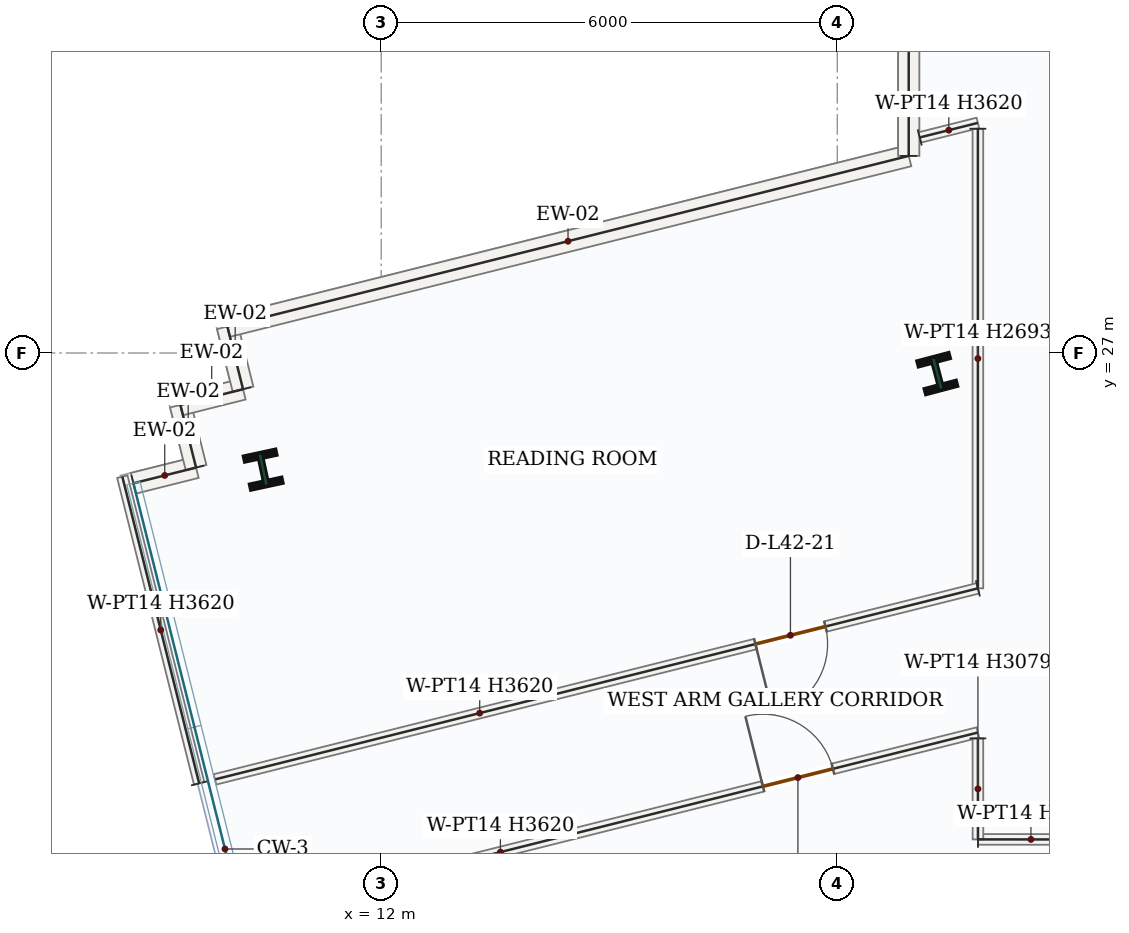
"""IFC4 building model, lengths in metres.
Left out: names, types, materials, properties, quantities, classifications, styles, units other than length and angle.
Written with IfcOpenShell. Run it as: python <this file> out.ifc"""

import sys

from ifc_helpers import new_model, si_unit, direction, frame, frame_2d, origin, origin_2d, place, context, subcontext, project, spatial, rectangle, i_section, extrude, source, transform, mapped, element, fill, save


model = new_model("IFC4")
c1 = context("Model", 3, precision=1e-05, world=origin(), true_north=direction((0.0, 1.0)))
c2 = subcontext(c1, "Body", "Model", "MODEL_VIEW")
j1 = project(units=[si_unit("LENGTHUNIT", "METRE"), si_unit("PLANEANGLEUNIT", "RADIAN")], contexts=[c1])
p1 = place(None, origin())
s1 = spatial("IfcSite", under=j1, at=p1, CompositionType="ELEMENT")
p2 = place(p1, origin())
s2 = spatial("IfcBuilding", under=s1, at=p2, CompositionType="ELEMENT")
p3 = place(p2, frame((0.0, 0.0, 182.4)))
s3 = spatial("IfcBuildingStorey", under=s2, at=p3, CompositionType="ELEMENT", Elevation=182.4)
m1 = source(origin(), c2, "Body", "SweptSolid", [
    extrude(i_section(OverallWidth=0.412, OverallDepth=0.435, WebThickness=0.036, FlangeThickness=0.057, FilletRadius=0.018, at=origin_2d()), origin(), (0.0, 0.0, 1.0), 3.9),
])
for number, where, z_axis, x_axis in (
    (1, (19.316, 26.729, 0.0), (0.0, 0.0, 1.0), (0.967, 0.255, 0.0)),
    (2, (10.447, 25.465, 0.0), (0.0, 0.0, 1.0), (0.977, 0.211, 0.0)),
):
    element("IfcColumn", number, at=place(p3, frame(where, z_axis=z_axis, x_axis=x_axis)), inside=s3, PredefinedType="COLUMN", context=c2, shape_type="MappedRepresentation", body=[
        mapped(m1, transform((0.0, 0.0, 0.0), x_axis=(1.0, 0.0, 0.0), y_axis=(0.0, 1.0, 0.0), z_axis=(0.0, 0.0, 1.0), scale=1.0)),
    ])
m2 = source(origin(), c2, "Body", "SweptSolid", [
    extrude(rectangle(XDim=0.85, YDim=0.28, at=frame_2d((0.425, 0.0))), origin(), (0.0, 0.0, 1.0), 3.62),
])
for number, where, z_axis, x_axis in (
    (3, (8.74, 25.286, 0.0), (0.0, 0.0, 1.0), (0.97, 0.243, 0.0)),
    (4, (9.564, 25.493, 0.0), (0.0, 0.0, 1.0), (-0.243, 0.97, 0.0)),
):
    element("IfcWall", number, at=place(p3, frame(where, z_axis=z_axis, x_axis=x_axis)), inside=s3, PredefinedType="SOLIDWALL", context=c2, shape_type="MappedRepresentation", body=[
        mapped(m2, transform((0.0, 0.0, 0.0), x_axis=(1.0, 0.0, 0.0), y_axis=(0.0, 1.0, 0.0), z_axis=(0.0, 0.0, 1.0), scale=1.0)),
    ])
m3 = source(origin(), c2, "Body", "SweptSolid", [
    extrude(rectangle(XDim=0.85, YDim=0.28, at=frame_2d((0.425, 0.0))), origin(), (0.0, 0.0, 1.0), 3.62),
])
p4 = place(p3, frame((9.358, 26.317, 0.0), z_axis=(0.0, 0.0, 1.0), x_axis=(0.970041063326, 0.242941012307, 0.0)))
e5 = element("IfcWall", 5, at=p4, inside=s3, PredefinedType="SOLIDWALL", context=c2, shape_type="MappedRepresentation", body=[
    mapped(m3, transform((0.0, 0.0, 0.0), x_axis=(1.0, 0.0, 0.0), y_axis=(0.0, 1.0, 0.0), z_axis=(0.0, 0.0, 1.0), scale=1.0)),
])
p5 = place(p3, frame((10.182, 26.524, 0.0), z_axis=(0.0, 0.0, 1.0), x_axis=(-0.243008704507, 0.970024107708, 0.0)))
e6 = element("IfcWall", 6, at=p5, inside=s3, PredefinedType="SOLIDWALL", context=c2, shape_type="MappedRepresentation", body=[
    mapped(m2, transform((0.0, 0.0, 0.0), x_axis=(1.0, 0.0, 0.0), y_axis=(0.0, 1.0, 0.0), z_axis=(0.0, 0.0, 1.0), scale=1.0)),
])
m4 = source(origin(), c2, "Body", "SweptSolid", [
    extrude(rectangle(XDim=9.241, YDim=0.28, at=frame_2d((4.621, 0.0))), origin(), (0.0, 0.0, 1.0), 3.62),
])
p6 = place(p3, frame((9.976, 27.348, 0.0), z_axis=(0.0, 0.0, 1.0), x_axis=(0.970044513566, 0.242927235402, 0.0)))
e7 = element("IfcWall", 7, at=p6, inside=s3, PredefinedType="SOLIDWALL", context=c2, shape_type="MappedRepresentation", body=[
    mapped(m4, transform((0.0, 0.0, 0.0), x_axis=(1.0, 0.0, 0.0), y_axis=(0.0, 1.0, 0.0), z_axis=(0.0, 0.0, 1.0), scale=1.0)),
])
m5 = source(origin(), c2, "Body", "SweptSolid", [
    extrude(rectangle(XDim=5.949, YDim=0.28, at=frame_2d((2.975, 0.0))), origin(), (0.0, 0.0, 1.0), 3.62),
])
p7 = place(p3, frame((18.94, 29.593, 0.0), z_axis=(0.0, 0.0, 1.0), x_axis=(0.0, 1.0, 0.0)))
e8 = element("IfcWall", 8, at=p7, inside=s3, PredefinedType="SOLIDWALL", context=c2, shape_type="MappedRepresentation", body=[
    mapped(m5, transform((0.0, 0.0, 0.0), x_axis=(1.0, 0.0, 0.0), y_axis=(0.0, 1.0, 0.0), z_axis=(0.0, 0.0, 1.0), scale=1.0)),
])
m6 = source(origin(), c2, "Body", "SweptSolid", [
    extrude(rectangle(XDim=1.394, YDim=0.14, at=frame_2d((0.697, 0.0))), origin(), (0.0, 0.0, 1.0), 3.62),
])
p8 = place(p3, frame((19.851, 20.601, 0.0), z_axis=(0.0, 0.0, 1.0), x_axis=(0.999999754632, -0.000700525222, 0.0)))
e9 = element("IfcWall", 9, at=p8, inside=s3, PredefinedType="PARTITIONING", context=c2, shape_type="MappedRepresentation", body=[
    mapped(m6, transform((0.0, 0.0, 0.0), x_axis=(1.0, 0.0, 0.0), y_axis=(0.0, 1.0, 0.0), z_axis=(0.0, 0.0, 1.0), scale=1.0)),
])
p9 = place(p3, frame((10.26, 19.605, 0.0), z_axis=(0.0, 0.0, 1.0), x_axis=(0.970042179759, 0.242936554451, 0.0)))
e10 = element("IfcWall", 10, at=p9, inside=s3, PredefinedType="PARTITIONING", context=c2, shape_type="SweptSolid", body=[
    extrude(rectangle(XDim=9.886, YDim=0.14, at=frame_2d((4.943, 0.0))), origin(), (0.0, 0.0, 1.0), 3.62),
])
p10 = place(p9, frame((6.97, 0.0, 0.0)))
e11 = element("IfcOpeningElement", 11, at=p10, cuts=e10, PredefinedType="OPENING", context=c2, shape_type="SweptSolid", body=[
    extrude(rectangle(XDim=0.95, YDim=2.15, at=frame_2d((0.475, 1.075))), frame((0.0, 0.08, 0.0), z_axis=(0.0, -1.0, 0.0), x_axis=(1.0, 0.0, 0.0)), (0.0, 0.0, 1.0), 0.16),
])
m7 = source(origin(), c2, "Body", "SweptSolid", [
    extrude(rectangle(XDim=1.329, YDim=0.14, at=frame_2d((0.664, 0.0))), origin(), (0.0, 0.0, 1.0), 3.079),
])
p11 = place(p3, frame((19.85, 21.93, 0.0), z_axis=(0.0, 0.0, 1.0), x_axis=(0.00073502369, -0.99999972987, 0.0)))
e12 = element("IfcWall", 12, at=p11, inside=s3, PredefinedType="PARTITIONING", context=c2, shape_type="MappedRepresentation", body=[
    mapped(m7, transform((0.0, 0.0, 0.0), x_axis=(1.0, 0.0, 0.0), y_axis=(0.0, 1.0, 0.0), z_axis=(0.0, 0.0, 1.0), scale=1.0)),
])
m8 = source(origin(), c2, "Body", "SweptSolid", [
    extrude(rectangle(XDim=4.16, YDim=0.14, at=frame_2d((2.08, 0.0))), origin(), (0.0, 0.0, 1.0), 3.62),
])
p12 = place(p3, frame((9.605, 21.338, 0.0), z_axis=(0.0, 0.0, 1.0), x_axis=(-0.242963670411, 0.970035388458, 0.0)))
e13 = element("IfcWall", 13, at=p12, inside=s3, PredefinedType="PARTITIONING", context=c2, shape_type="MappedRepresentation", body=[
    mapped(m8, transform((0.0, 0.0, 0.0), x_axis=(1.0, 0.0, 0.0), y_axis=(0.0, 1.0, 0.0), z_axis=(0.0, 0.0, 1.0), scale=1.0)),
])
m9 = source(origin(), c2, "Body", "SweptSolid", [
    extrude(rectangle(XDim=0.789, YDim=0.14, at=frame_2d((0.395, 0.0))), origin(), (0.0, 0.0, 1.0), 3.62),
])
p13 = place(p3, frame((19.085, 29.836, 0.0), z_axis=(0.0, 0.0, 1.0), x_axis=(0.970033159667, 0.242972568711, 0.0)))
e14 = element("IfcWall", 14, at=p13, inside=s3, PredefinedType="PARTITIONING", context=c2, shape_type="MappedRepresentation", body=[
    mapped(m9, transform((0.0, 0.0, 0.0), x_axis=(1.0, 0.0, 0.0), y_axis=(0.0, 1.0, 0.0), z_axis=(0.0, 0.0, 1.0), scale=1.0)),
])
m10 = source(origin(), c2, "Body", "SweptSolid", [
    extrude(rectangle(XDim=6.046, YDim=0.14, at=frame_2d((3.023, 0.0))), origin(), (0.0, 0.0, 1.0), 2.693),
])
p14 = place(p3, frame((19.85, 29.95, 0.0), z_axis=(0.0, 0.0, 1.0), x_axis=(0.0, -1.0, 0.0)))
e15 = element("IfcWall", 15, at=p14, inside=s3, PredefinedType="PARTITIONING", context=c2, shape_type="MappedRepresentation", body=[
    mapped(m10, transform((0.0, 0.0, 0.0), x_axis=(1.0, 0.0, 0.0), y_axis=(0.0, 1.0, 0.0), z_axis=(0.0, 0.0, 1.0), scale=1.0)),
])
p15 = place(p3, frame((19.85, 23.904, 0.0), z_axis=(0.0, 0.0, 1.0), x_axis=(-0.97004665335, -0.24291869077, 0.0)))
e16 = element("IfcWall", 16, at=p15, inside=s3, PredefinedType="PARTITIONING", context=c2, shape_type="SweptSolid", body=[
    extrude(rectangle(XDim=10.347, YDim=0.14, at=frame_2d((5.173, 0.0))), origin(), (0.0, 0.0, 1.0), 3.62),
])
p16 = place(p15, frame((2.067, 0.0, 0.0)))
e17 = element("IfcOpeningElement", 17, at=p16, cuts=e16, PredefinedType="OPENING", context=c2, shape_type="SweptSolid", body=[
    extrude(rectangle(XDim=0.95, YDim=2.15, at=frame_2d((0.475, 1.075))), frame((0.0, 0.08, 0.0), z_axis=(0.0, -1.0, 0.0), x_axis=(1.0, 0.0, 0.0)), (0.0, 0.0, 1.0), 0.16),
])
m11 = source(origin(), c2, "Body", "SweptSolid", [
    extrude(rectangle(XDim=0.95, YDim=2.15, at=frame_2d((0.475, 1.075))), frame((0.0, 0.025, 0.0), z_axis=(0.0, -1.0, 0.0), x_axis=(1.0, 0.0, 0.0)), (0.0, 0.0, 1.0), 0.05),
])
p17 = place(p16, origin())
e18 = element("IfcDoor", 18, at=p17, inside=s3, OperationType="SINGLE_SWING_RIGHT", PredefinedType="DOOR", context=c2, shape_type="MappedRepresentation", body=[
    mapped(m11, transform((0.0, 0.0, 0.0), x_axis=(1.0, 0.0, 0.0), y_axis=(0.0, 1.0, 0.0), z_axis=(0.0, 0.0, 1.0), scale=1.0)),
])
fill(e17, e18)
p18 = place(p10, origin())
e19 = element("IfcDoor", 19, at=p18, inside=s3, OperationType="SINGLE_SWING_LEFT", PredefinedType="DOOR", context=c2, shape_type="MappedRepresentation", body=[
    mapped(m11, transform((0.0, 0.0, 0.0), x_axis=(1.0, 0.0, 0.0), y_axis=(0.0, 1.0, 0.0), z_axis=(0.0, 0.0, 1.0), scale=1.0)),
])
fill(e11, e19)
save(model, sys.argv[1])
